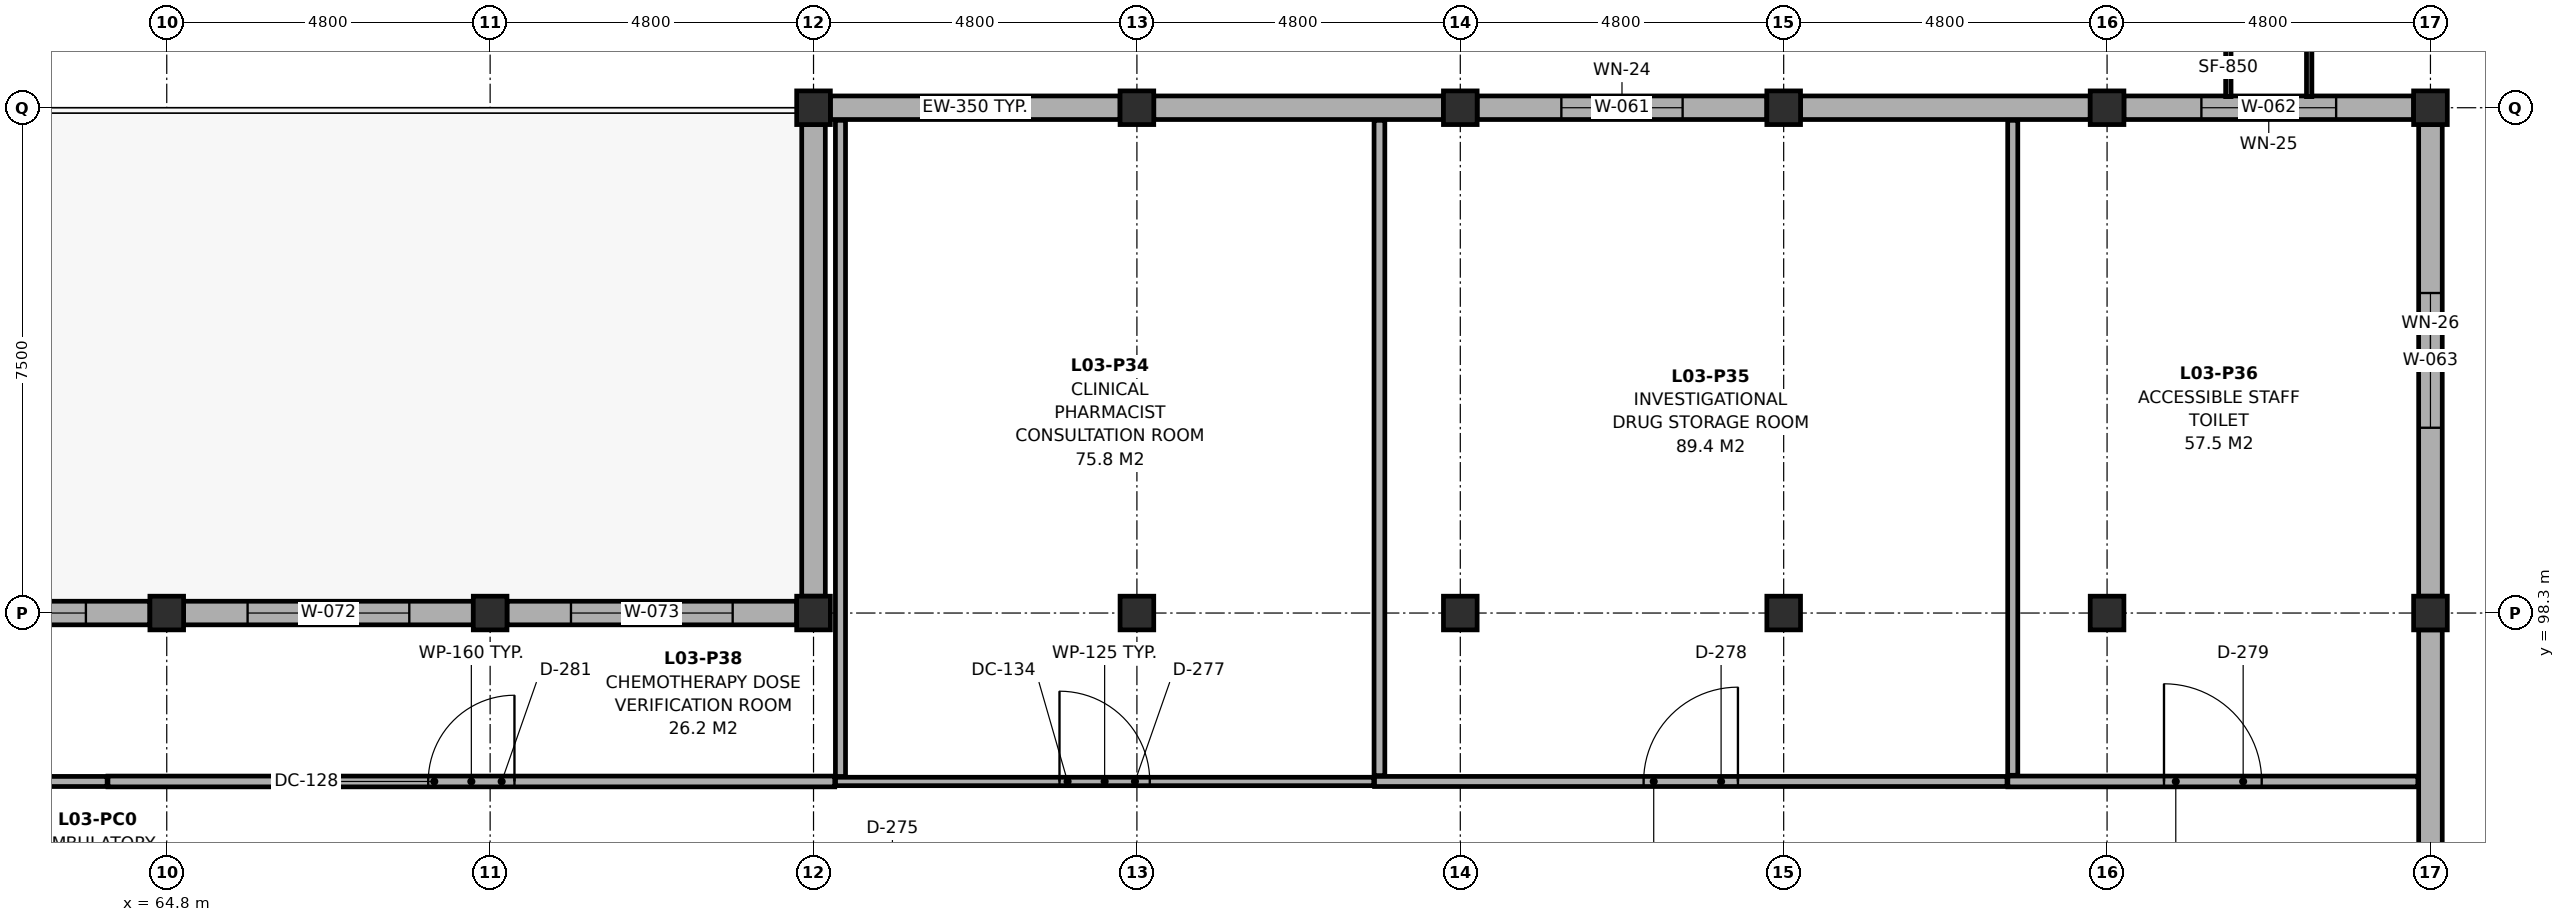
"""IFC4 building model, lengths in metres.
Left out: names, types, materials, properties, quantities, classifications, styles, units other than length and angle.
Written with IfcOpenShell. Run it as: python <this file> out.ifc"""

import sys

from ifc_helpers import new_model, si_unit, direction, frame, frame_2d, origin, origin_2d, place, context, subcontext, project, spatial, rectangle, extrude, element, fill, save


model = new_model("IFC4")
c1 = context("Model", 3, precision=1e-05, world=origin(), true_north=direction((0.0, 1.0)))
c2 = subcontext(c1, "Body", "Model", "MODEL_VIEW")
j1 = project(units=[si_unit("LENGTHUNIT", "METRE"), si_unit("PLANEANGLEUNIT", "RADIAN")], contexts=[c1])
p1 = place(None, origin())
s1 = spatial("IfcSite", under=j1, at=p1, CompositionType="ELEMENT")
p2 = place(p1, origin())
s2 = spatial("IfcBuilding", under=s1, at=p2, CompositionType="ELEMENT")
p3 = place(p2, frame((0.0, 0.0, 13.5)))
s3 = spatial("IfcBuildingStorey", under=s2, at=p3, CompositionType="ELEMENT", Elevation=13.5)
for number, where, z_axis, x_axis in (
    (1, (64.8, 98.3, 0.0), (0.0, 0.0, 1.0), (1.0, 0.0, 0.0)),
    (2, (69.6, 98.3, 0.0), (0.0, 0.0, 1.0), (1.0, 0.0, 0.0)),
):
    element("IfcColumn", number, at=place(p3, frame(where, z_axis=z_axis, x_axis=x_axis)), inside=s3, PredefinedType="COLUMN", context=c2, shape_type="SweptSolid", body=[
        extrude(rectangle(XDim=0.5, YDim=0.5, at=origin_2d()), origin(), (0.0, 0.0, 1.0), 5.029),
    ])
for number, where, z_axis, x_axis in (
    (3, (74.4, 98.3, 0.0), (0.0, 0.0, 1.0), (1.0, 0.0, 0.0)),
    (4, (74.4, 105.8, 0.0), (0.0, 0.0, 1.0), (1.0, 0.0, 0.0)),
    (5, (79.2, 98.3, 0.0), (0.0, 0.0, 1.0), (1.0, 0.0, 0.0)),
    (6, (79.2, 105.8, 0.0), (0.0, 0.0, 1.0), (1.0, 0.0, 0.0)),
    (7, (84.0, 98.3, 0.0), (0.0, 0.0, 1.0), (1.0, 0.0, 0.0)),
    (8, (84.0, 105.8, 0.0), (0.0, 0.0, 1.0), (1.0, 0.0, 0.0)),
    (9, (88.8, 98.3, 0.0), (0.0, 0.0, 1.0), (1.0, 0.0, 0.0)),
    (10, (88.8, 105.8, 0.0), (0.0, 0.0, 1.0), (1.0, 0.0, 0.0)),
    (11, (93.6, 98.3, 0.0), (0.0, 0.0, 1.0), (1.0, 0.0, 0.0)),
    (12, (93.6, 105.8, 0.0), (0.0, 0.0, 1.0), (1.0, 0.0, 0.0)),
    (13, (98.4, 98.3, 0.0), (0.0, 0.0, 1.0), (1.0, 0.0, 0.0)),
    (14, (98.4, 105.8, 0.0), (0.0, 0.0, 1.0), (1.0, 0.0, 0.0)),
):
    element("IfcColumn", number, at=place(p3, frame(where, z_axis=z_axis, x_axis=x_axis)), inside=s3, PredefinedType="COLUMN", context=c2, shape_type="SweptSolid", body=[
        extrude(rectangle(XDim=0.5, YDim=0.5, at=origin_2d()), origin(), (0.0, 0.0, 1.0), 3.8),
    ])
for number, where, z_axis, x_axis in (
    (15, (74.65, 105.8, 0.0), (0.0, 0.0, 1.0), (1.0, 0.0, 0.0)),
    (16, (79.45, 105.8, 0.0), (0.0, 0.0, 1.0), (1.0, 0.0, 0.0)),
):
    element("IfcWall", number, at=place(p3, frame(where, z_axis=z_axis, x_axis=x_axis)), inside=s3, PredefinedType="SOLIDWALL", context=c2, shape_type="SweptSolid", body=[
        extrude(rectangle(XDim=4.3, YDim=0.35, at=frame_2d((2.15, 0.0))), origin(), (0.0, 0.0, 1.0), 3.7),
    ])
p4 = place(p3, frame((84.25, 105.8, 0.0), z_axis=(0.0, 0.0, 1.0), x_axis=(1.0, 0.0, 0.0)))
e17 = element("IfcWall", 17, at=p4, inside=s3, PredefinedType="SOLIDWALL", context=c2, shape_type="SweptSolid", body=[
    extrude(rectangle(XDim=4.3, YDim=0.35, at=frame_2d((2.15, 0.0))), origin(), (0.0, 0.0, 1.0), 3.7),
])
p5 = place(p4, frame((1.25, 0.0, 0.9)))
e18 = element("IfcOpeningElement", 18, at=p5, cuts=e17, PredefinedType="OPENING", context=c2, shape_type="SweptSolid", body=[
    extrude(rectangle(XDim=1.8, YDim=1.9, at=frame_2d((0.9, 0.95))), frame((0.0, 0.187, 0.0), z_axis=(0.0, -1.0, 0.0), x_axis=(1.0, 0.0, 0.0)), (0.0, 0.0, 1.0), 0.374),
])
p6 = place(p3, frame((89.05, 105.8, 0.0), z_axis=(0.0, 0.0, 1.0), x_axis=(1.0, 0.0, 0.0)))
e19 = element("IfcWall", 19, at=p6, inside=s3, PredefinedType="SOLIDWALL", context=c2, shape_type="SweptSolid", body=[
    extrude(rectangle(XDim=4.3, YDim=0.35, at=frame_2d((2.15, 0.0))), origin(), (0.0, 0.0, 1.0), 3.7),
])
p7 = place(p3, frame((93.85, 105.8, 0.0), z_axis=(0.0, 0.0, 1.0), x_axis=(1.0, 0.0, 0.0)))
e20 = element("IfcWall", 20, at=p7, inside=s3, PredefinedType="SOLIDWALL", context=c2, shape_type="SweptSolid", body=[
    extrude(rectangle(XDim=4.3, YDim=0.35, at=frame_2d((2.15, 0.0))), origin(), (0.0, 0.0, 1.0), 3.7),
])
p8 = place(p7, frame((1.15, 0.0, 0.9)))
e21 = element("IfcOpeningElement", 21, at=p8, cuts=e20, PredefinedType="OPENING", context=c2, shape_type="SweptSolid", body=[
    extrude(rectangle(XDim=2.0, YDim=1.3, at=frame_2d((1.0, 0.65))), frame((0.0, 0.187, 0.0), z_axis=(0.0, -1.0, 0.0), x_axis=(1.0, 0.0, 0.0)), (0.0, 0.0, 1.0), 0.374),
])
p9 = place(p3, frame((98.4, 105.55, 0.0), z_axis=(0.0, 0.0, 1.0), x_axis=(0.0, -1.0, 0.0)))
e22 = element("IfcWall", 22, at=p9, inside=s3, PredefinedType="SOLIDWALL", context=c2, shape_type="SweptSolid", body=[
    extrude(rectangle(XDim=7.0, YDim=0.35, at=frame_2d((3.5, 0.0))), origin(), (0.0, 0.0, 1.0), 3.7),
])
p10 = place(p9, frame((2.5, 0.0, 0.9)))
e23 = element("IfcOpeningElement", 23, at=p10, cuts=e22, PredefinedType="OPENING", context=c2, shape_type="SweptSolid", body=[
    extrude(rectangle(XDim=2.0, YDim=1.5, at=frame_2d((1.0, 0.75))), frame((0.0, 0.187, 0.0), z_axis=(0.0, -1.0, 0.0), x_axis=(1.0, 0.0, 0.0)), (0.0, 0.0, 1.0), 0.374),
])
p11 = place(p3, frame((98.4, 98.05, 0.0), z_axis=(0.0, 0.0, 1.0), x_axis=(0.0, -1.0, 0.0)))
e24 = element("IfcWall", 24, at=p11, inside=s3, PredefinedType="SOLIDWALL", context=c2, shape_type="SweptSolid", body=[
    extrude(rectangle(XDim=7.0, YDim=0.35, at=frame_2d((3.5, 0.0))), origin(), (0.0, 0.0, 1.0), 3.7),
])
p12 = place(p3, frame((60.25, 98.3, 0.0), z_axis=(0.0, 0.0, 1.0), x_axis=(1.0, 0.0, 0.0)))
e25 = element("IfcWall", 25, at=p12, inside=s3, PredefinedType="SOLIDWALL", context=c2, shape_type="SweptSolid", body=[
    extrude(rectangle(XDim=4.3, YDim=0.35, at=frame_2d((2.15, 0.0))), origin(), (0.0, 0.0, 1.0), 3.7),
])
p13 = place(p12, frame((0.95, 0.0, 0.9)))
e26 = element("IfcOpeningElement", 26, at=p13, cuts=e25, PredefinedType="OPENING", context=c2, shape_type="SweptSolid", body=[
    extrude(rectangle(XDim=2.4, YDim=1.5, at=frame_2d((1.2, 0.75))), frame((0.0, 0.187, 0.0), z_axis=(0.0, -1.0, 0.0), x_axis=(1.0, 0.0, 0.0)), (0.0, 0.0, 1.0), 0.374),
])
p14 = place(p3, frame((65.05, 98.3, 0.0), z_axis=(0.0, 0.0, 1.0), x_axis=(1.0, 0.0, 0.0)))
e27 = element("IfcWall", 27, at=p14, inside=s3, PredefinedType="SOLIDWALL", context=c2, shape_type="SweptSolid", body=[
    extrude(rectangle(XDim=4.3, YDim=0.35, at=frame_2d((2.15, 0.0))), origin(), (0.0, 0.0, 1.0), 3.7),
])
p15 = place(p14, frame((0.95, 0.0, 0.9)))
e28 = element("IfcOpeningElement", 28, at=p15, cuts=e27, PredefinedType="OPENING", context=c2, shape_type="SweptSolid", body=[
    extrude(rectangle(XDim=2.4, YDim=1.7, at=frame_2d((1.2, 0.85))), frame((0.0, 0.187, 0.0), z_axis=(0.0, -1.0, 0.0), x_axis=(1.0, 0.0, 0.0)), (0.0, 0.0, 1.0), 0.374),
])
p16 = place(p3, frame((69.85, 98.3, 0.0), z_axis=(0.0, 0.0, 1.0), x_axis=(1.0, 0.0, 0.0)))
e29 = element("IfcWall", 29, at=p16, inside=s3, PredefinedType="SOLIDWALL", context=c2, shape_type="SweptSolid", body=[
    extrude(rectangle(XDim=4.3, YDim=0.35, at=frame_2d((2.15, 0.0))), origin(), (0.0, 0.0, 1.0), 3.7),
])
p17 = place(p16, frame((0.95, 0.0, 0.9)))
e30 = element("IfcOpeningElement", 30, at=p17, cuts=e29, PredefinedType="OPENING", context=c2, shape_type="SweptSolid", body=[
    extrude(rectangle(XDim=2.4, YDim=1.9, at=frame_2d((1.2, 0.95))), frame((0.0, 0.187, 0.0), z_axis=(0.0, -1.0, 0.0), x_axis=(1.0, 0.0, 0.0)), (0.0, 0.0, 1.0), 0.374),
])
p18 = place(p3, frame((74.4, 98.55, 0.0), z_axis=(0.0, 0.0, 1.0), x_axis=(0.0, 1.0, 0.0)))
e31 = element("IfcWall", 31, at=p18, inside=s3, PredefinedType="SOLIDWALL", context=c2, shape_type="SweptSolid", body=[
    extrude(rectangle(XDim=7.0, YDim=0.35, at=frame_2d((3.5, 0.0))), origin(), (0.0, 0.0, 1.0), 3.7),
])
p19 = place(p3, frame((52.687, 95.8, 0.0), z_axis=(0.0, 0.0, 1.0), x_axis=(1.0, 0.0, 0.0)))
e32 = element("IfcWall", 32, at=p19, inside=s3, PredefinedType="PARTITIONING", context=c2, shape_type="SweptSolid", body=[
    extrude(rectangle(XDim=11.228, YDim=0.15, at=frame_2d((5.614, 0.0))), origin(), (0.0, 0.0, 1.0), 3.7),
])
p20 = place(p19, frame((4.994, 0.0, 0.0)))
e33 = element("IfcOpeningElement", 33, at=p20, cuts=e32, PredefinedType="OPENING", context=c2, shape_type="SweptSolid", body=[
    extrude(rectangle(XDim=1.24, YDim=2.2, at=frame_2d((0.62, 1.1))), frame((0.0, 0.087, 0.0), z_axis=(0.0, -1.0, 0.0), x_axis=(1.0, 0.0, 0.0)), (0.0, 0.0, 1.0), 0.174),
])
p21 = place(p3, frame((63.927, 95.8, 0.0), z_axis=(0.0, 0.0, 1.0), x_axis=(1.0, 0.0, 0.0)))
e34 = element("IfcWall", 34, at=p21, inside=s3, PredefinedType="PARTITIONING", context=c2, shape_type="SweptSolid", body=[
    extrude(rectangle(XDim=10.788, YDim=0.16, at=frame_2d((5.394, 0.0))), origin(), (0.0, 0.0, 1.0), 3.7),
])
p22 = place(p21, frame((4.754, 0.0, 0.0)))
e35 = element("IfcOpeningElement", 35, at=p22, cuts=e34, PredefinedType="OPENING", context=c2, shape_type="SweptSolid", body=[
    extrude(rectangle(XDim=1.28, YDim=2.22, at=frame_2d((0.64, 1.11))), frame((0.0, 0.092, 0.0), z_axis=(0.0, -1.0, 0.0), x_axis=(1.0, 0.0, 0.0)), (0.0, 0.0, 1.0), 0.184),
])
p23 = place(p3, frame((74.727, 95.8, 0.0), z_axis=(0.0, 0.0, 1.0), x_axis=(1.0, 0.0, 0.0)))
e36 = element("IfcWall", 36, at=p23, inside=s3, PredefinedType="PARTITIONING", context=c2, shape_type="SweptSolid", body=[
    extrude(rectangle(XDim=7.988, YDim=0.125, at=frame_2d((3.994, 0.0))), origin(), (0.0, 0.0, 1.0), 3.7),
])
p24 = place(p23, frame((3.324, 0.0, 0.0)))
e37 = element("IfcOpeningElement", 37, at=p24, cuts=e36, PredefinedType="OPENING", context=c2, shape_type="SweptSolid", body=[
    extrude(rectangle(XDim=1.34, YDim=2.24, at=frame_2d((0.67, 1.12))), frame((0.0, 0.074, 0.0), z_axis=(0.0, -1.0, 0.0), x_axis=(1.0, 0.0, 0.0)), (0.0, 0.0, 1.0), 0.149),
])
p25 = place(p3, frame((82.727, 95.8, 0.0), z_axis=(0.0, 0.0, 1.0), x_axis=(1.0, 0.0, 0.0)))
e38 = element("IfcWall", 38, at=p25, inside=s3, PredefinedType="PARTITIONING", context=c2, shape_type="SweptSolid", body=[
    extrude(rectangle(XDim=9.388, YDim=0.15, at=frame_2d((4.694, 0.0))), origin(), (0.0, 0.0, 1.0), 3.7),
])
p26 = place(p25, frame((3.994, 0.0, 0.0)))
e39 = element("IfcOpeningElement", 39, at=p26, cuts=e38, PredefinedType="OPENING", context=c2, shape_type="SweptSolid", body=[
    extrude(rectangle(XDim=1.4, YDim=2.25, at=frame_2d((0.7, 1.125))), frame((0.0, 0.087, 0.0), z_axis=(0.0, -1.0, 0.0), x_axis=(1.0, 0.0, 0.0)), (0.0, 0.0, 1.0), 0.174),
])
p27 = place(p3, frame((92.127, 95.8, 0.0), z_axis=(0.0, 0.0, 1.0), x_axis=(1.0, 0.0, 0.0)))
e40 = element("IfcWall", 40, at=p27, inside=s3, PredefinedType="PARTITIONING", context=c2, shape_type="SweptSolid", body=[
    extrude(rectangle(XDim=6.086, YDim=0.16, at=frame_2d((3.043, 0.0))), origin(), (0.0, 0.0, 1.0), 3.7),
])
p28 = place(p27, frame((2.318, 0.0, 0.0)))
e41 = element("IfcOpeningElement", 41, at=p28, cuts=e40, PredefinedType="OPENING", context=c2, shape_type="SweptSolid", body=[
    extrude(rectangle(XDim=1.45, YDim=2.26, at=frame_2d((0.725, 1.13))), frame((0.0, 0.092, 0.0), z_axis=(0.0, -1.0, 0.0), x_axis=(1.0, 0.0, 0.0)), (0.0, 0.0, 1.0), 0.184),
])
p29 = place(p3, frame((74.8, 95.875, 0.0), z_axis=(0.0, 0.0, 1.0), x_axis=(0.0, 1.0, 0.0)))
e42 = element("IfcWall", 42, at=p29, inside=s3, PredefinedType="PARTITIONING", context=c2, shape_type="SweptSolid", body=[
    extrude(rectangle(XDim=9.739, YDim=0.15, at=frame_2d((4.869, 0.0))), origin(), (0.0, 0.0, 1.0), 3.7),
])
p30 = place(p3, frame((82.8, 95.887, 0.0), z_axis=(0.0, 0.0, 1.0), x_axis=(0.0, 1.0, 0.0)))
e43 = element("IfcWall", 43, at=p30, inside=s3, PredefinedType="PARTITIONING", context=c2, shape_type="SweptSolid", body=[
    extrude(rectangle(XDim=9.726, YDim=0.16, at=frame_2d((4.863, 0.0))), origin(), (0.0, 0.0, 1.0), 3.7),
])
p31 = place(p3, frame((92.2, 95.892, 0.0), z_axis=(0.0, 0.0, 1.0), x_axis=(0.0, 1.0, 0.0)))
e44 = element("IfcWall", 44, at=p31, inside=s3, PredefinedType="PARTITIONING", context=c2, shape_type="SweptSolid", body=[
    extrude(rectangle(XDim=9.721, YDim=0.15, at=frame_2d((4.86, 0.0))), origin(), (0.0, 0.0, 1.0), 3.7),
])
p32 = place(p5, origin())
e45 = element("IfcWindow", 45, at=p32, inside=s3, PartitioningType="DOUBLE_PANEL_VERTICAL", PredefinedType="WINDOW", context=c2, shape_type="SweptSolid", body=[
    extrude(rectangle(XDim=1.8, YDim=1.9, at=frame_2d((0.9, 0.95))), frame((0.0, 0.03, 0.0), z_axis=(0.0, -1.0, 0.0), x_axis=(1.0, 0.0, 0.0)), (0.0, 0.0, 1.0), 0.06),
])
fill(e18, e45)
p33 = place(p8, origin())
e46 = element("IfcWindow", 46, at=p33, inside=s3, PartitioningType="DOUBLE_PANEL_VERTICAL", PredefinedType="WINDOW", context=c2, shape_type="SweptSolid", body=[
    extrude(rectangle(XDim=2.0, YDim=1.3, at=frame_2d((1.0, 0.65))), frame((0.0, 0.03, 0.0), z_axis=(0.0, -1.0, 0.0), x_axis=(1.0, 0.0, 0.0)), (0.0, 0.0, 1.0), 0.06),
])
fill(e21, e46)
p34 = place(p10, origin())
e47 = element("IfcWindow", 47, at=p34, inside=s3, PartitioningType="DOUBLE_PANEL_VERTICAL", PredefinedType="WINDOW", context=c2, shape_type="SweptSolid", body=[
    extrude(rectangle(XDim=2.0, YDim=1.5, at=frame_2d((1.0, 0.75))), frame((0.0, 0.03, 0.0), z_axis=(0.0, -1.0, 0.0), x_axis=(1.0, 0.0, 0.0)), (0.0, 0.0, 1.0), 0.06),
])
fill(e23, e47)
p35 = place(p13, origin())
e48 = element("IfcWindow", 48, at=p35, inside=s3, PartitioningType="DOUBLE_PANEL_VERTICAL", PredefinedType="WINDOW", context=c2, shape_type="SweptSolid", body=[
    extrude(rectangle(XDim=2.4, YDim=1.5, at=frame_2d((1.2, 0.75))), frame((0.0, 0.03, 0.0), z_axis=(0.0, -1.0, 0.0), x_axis=(1.0, 0.0, 0.0)), (0.0, 0.0, 1.0), 0.06),
])
fill(e26, e48)
p36 = place(p15, origin())
e49 = element("IfcWindow", 49, at=p36, inside=s3, PartitioningType="DOUBLE_PANEL_VERTICAL", PredefinedType="WINDOW", context=c2, shape_type="SweptSolid", body=[
    extrude(rectangle(XDim=2.4, YDim=1.7, at=frame_2d((1.2, 0.85))), frame((0.0, 0.03, 0.0), z_axis=(0.0, -1.0, 0.0), x_axis=(1.0, 0.0, 0.0)), (0.0, 0.0, 1.0), 0.06),
])
fill(e28, e49)
p37 = place(p17, origin())
e50 = element("IfcWindow", 50, at=p37, inside=s3, PartitioningType="DOUBLE_PANEL_VERTICAL", PredefinedType="WINDOW", context=c2, shape_type="SweptSolid", body=[
    extrude(rectangle(XDim=2.4, YDim=1.9, at=frame_2d((1.2, 0.95))), frame((0.0, 0.03, 0.0), z_axis=(0.0, -1.0, 0.0), x_axis=(1.0, 0.0, 0.0)), (0.0, 0.0, 1.0), 0.06),
])
fill(e30, e50)
p38 = place(p22, origin())
e51 = element("IfcDoor", 51, at=p38, inside=s3, OperationType="SINGLE_SWING_RIGHT", PredefinedType="DOOR", context=c2, shape_type="SweptSolid", body=[
    extrude(rectangle(XDim=1.28, YDim=2.22, at=frame_2d((0.64, 1.11))), frame((0.0, 0.025, 0.0), z_axis=(0.0, -1.0, 0.0), x_axis=(1.0, 0.0, 0.0)), (0.0, 0.0, 1.0), 0.05),
])
fill(e35, e51)
p39 = place(p24, origin())
e52 = element("IfcDoor", 52, at=p39, inside=s3, OperationType="SINGLE_SWING_LEFT", PredefinedType="DOOR", context=c2, shape_type="SweptSolid", body=[
    extrude(rectangle(XDim=1.34, YDim=2.24, at=frame_2d((0.67, 1.12))), frame((0.0, 0.025, 0.0), z_axis=(0.0, -1.0, 0.0), x_axis=(1.0, 0.0, 0.0)), (0.0, 0.0, 1.0), 0.05),
])
fill(e37, e52)
p40 = place(p26, origin())
e53 = element("IfcDoor", 53, at=p40, inside=s3, OperationType="SINGLE_SWING_RIGHT", PredefinedType="DOOR", context=c2, shape_type="SweptSolid", body=[
    extrude(rectangle(XDim=1.4, YDim=2.25, at=frame_2d((0.7, 1.125))), frame((0.0, 0.025, 0.0), z_axis=(0.0, -1.0, 0.0), x_axis=(1.0, 0.0, 0.0)), (0.0, 0.0, 1.0), 0.05),
])
fill(e39, e53)
p41 = place(p28, origin())
e54 = element("IfcDoor", 54, at=p41, inside=s3, OperationType="SINGLE_SWING_LEFT", PredefinedType="DOOR", context=c2, shape_type="SweptSolid", body=[
    extrude(rectangle(XDim=1.45, YDim=2.26, at=frame_2d((0.725, 1.13))), frame((0.0, 0.025, 0.0), z_axis=(0.0, -1.0, 0.0), x_axis=(1.0, 0.0, 0.0)), (0.0, 0.0, 1.0), 0.05),
])
fill(e41, e54)
save(model, sys.argv[1])
